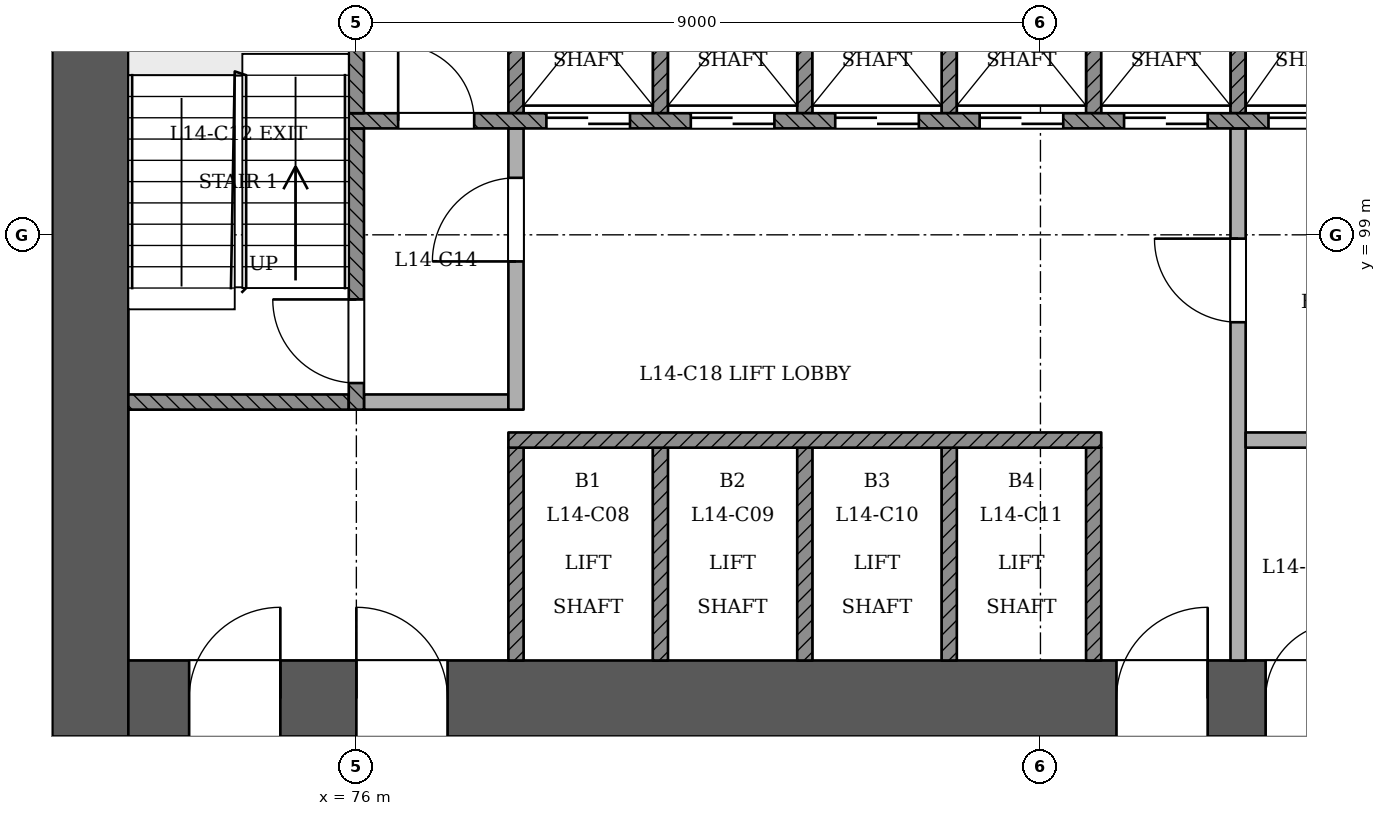
"""IFC4 building model, lengths in metres.
Left out: names, types, materials, properties, quantities, classifications, styles, units other than length and angle.
Written with IfcOpenShell. Run it as: python <this file> out.ifc"""

import sys

from ifc_helpers import new_model, si_unit, direction, frame, frame_2d, origin, place, context, subcontext, project, spatial, rectangle, extrude, element, fill, save


model = new_model("IFC4")
c1 = context("Model", 3, precision=1e-05, world=origin(), true_north=direction((0.0, 1.0)))
c2 = subcontext(c1, "Body", "Model", "MODEL_VIEW")
j1 = project(units=[si_unit("LENGTHUNIT", "METRE"), si_unit("PLANEANGLEUNIT", "RADIAN")], contexts=[c1])
p1 = place(None, origin())
s1 = spatial("IfcSite", under=j1, at=p1, CompositionType="ELEMENT")
p2 = place(p1, origin())
s2 = spatial("IfcBuilding", under=s1, at=p2, CompositionType="ELEMENT")
p3 = place(p2, frame((0.0, 0.0, 59.4)))
s3 = spatial("IfcBuildingStorey", under=s2, at=p3, CompositionType="ELEMENT", Elevation=59.4)
p4 = place(p3, frame((72.5, 92.9, 0.0), z_axis=(0.0, 0.0, 1.0), x_axis=(1.0, 0.0, 0.0)))
e1 = element("IfcWall", 1, at=p4, inside=s3, PredefinedType="SHEAR", context=c2, shape_type="SweptSolid", body=[
    extrude(rectangle(XDim=25.5, YDim=1.0, at=frame_2d((12.75, 0.0))), origin(), (0.0, 0.0, 1.0), 3.6),
])
p5 = place(p4, frame((1.3, 0.0, 0.0)))
e2 = element("IfcOpeningElement", 2, at=p5, cuts=e1, PredefinedType="OPENING", context=c2, shape_type="SweptSolid", body=[
    extrude(rectangle(XDim=1.2, YDim=2.1, at=frame_2d((0.6, 1.05))), frame((0.0, 0.51, 0.0), z_axis=(0.0, -1.0, 0.0), x_axis=(1.0, 0.0, 0.0)), (0.0, 0.0, 1.0), 1.021),
])
p6 = place(p4, frame((3.5, 0.0, 0.0)))
e3 = element("IfcOpeningElement", 3, at=p6, cuts=e1, PredefinedType="OPENING", context=c2, shape_type="SweptSolid", body=[
    extrude(rectangle(XDim=1.2, YDim=2.1, at=frame_2d((0.6, 1.05))), frame((0.0, 0.51, 0.0), z_axis=(0.0, -1.0, 0.0), x_axis=(1.0, 0.0, 0.0)), (0.0, 0.0, 1.0), 1.021),
])
p7 = place(p4, frame((13.5, 0.0, 0.0)))
e4 = element("IfcOpeningElement", 4, at=p7, cuts=e1, PredefinedType="OPENING", context=c2, shape_type="SweptSolid", body=[
    extrude(rectangle(XDim=1.2, YDim=2.1, at=frame_2d((0.6, 1.05))), frame((0.0, 0.51, 0.0), z_axis=(0.0, -1.0, 0.0), x_axis=(1.0, 0.0, 0.0)), (0.0, 0.0, 1.0), 1.021),
])
p8 = place(p4, frame((15.462, 0.0, 0.0)))
e5 = element("IfcOpeningElement", 5, at=p8, cuts=e1, PredefinedType="OPENING", context=c2, shape_type="SweptSolid", body=[
    extrude(rectangle(XDim=1.0, YDim=2.1, at=frame_2d((0.5, 1.05))), frame((0.0, 0.51, 0.0), z_axis=(0.0, -1.0, 0.0), x_axis=(1.0, 0.0, 0.0)), (0.0, 0.0, 1.0), 1.021),
])
p9 = place(p4, frame((18.3, 0.0, 0.0)))
e6 = element("IfcOpeningElement", 6, at=p9, cuts=e1, PredefinedType="OPENING", context=c2, shape_type="SweptSolid", body=[
    extrude(rectangle(XDim=1.0, YDim=2.1, at=frame_2d((0.5, 1.05))), frame((0.0, 0.51, 0.0), z_axis=(0.0, -1.0, 0.0), x_axis=(1.0, 0.0, 0.0)), (0.0, 0.0, 1.0), 1.021),
])
p10 = place(p4, frame((21.2, 0.0, 0.0)))
e7 = element("IfcOpeningElement", 7, at=p10, cuts=e1, PredefinedType="OPENING", context=c2, shape_type="SweptSolid", body=[
    extrude(rectangle(XDim=1.0, YDim=2.1, at=frame_2d((0.5, 1.05))), frame((0.0, 0.51, 0.0), z_axis=(0.0, -1.0, 0.0), x_axis=(1.0, 0.0, 0.0)), (0.0, 0.0, 1.0), 1.021),
])
p11 = place(p4, frame((23.087, 0.0, 0.0)))
e8 = element("IfcOpeningElement", 8, at=p11, cuts=e1, PredefinedType="OPENING", context=c2, shape_type="SweptSolid", body=[
    extrude(rectangle(XDim=1.0, YDim=2.1, at=frame_2d((0.5, 1.05))), frame((0.0, 0.51, 0.0), z_axis=(0.0, -1.0, 0.0), x_axis=(1.0, 0.0, 0.0)), (0.0, 0.0, 1.0), 1.021),
])
p12 = place(p3, frame((72.5, 103.9, 0.0), z_axis=(0.0, 0.0, 1.0), x_axis=(0.0, -1.0, 0.0)))
e9 = element("IfcWall", 9, at=p12, inside=s3, PredefinedType="SHEAR", context=c2, shape_type="SweptSolid", body=[
    extrude(rectangle(XDim=11.5, YDim=1.0, at=frame_2d((5.75, 0.0))), origin(), (0.0, 0.0, 1.0), 3.6),
])
p13 = place(p3, frame((62.256, 96.887, 0.0), z_axis=(0.0, 0.0, 1.0), x_axis=(0.500001966348, -0.86602426851, 0.0)))
e10 = element("IfcWall", 10, at=p13, inside=s3, PredefinedType="PARTITIONING", context=c2, shape_type="SweptSolid", body=[
    extrude(rectangle(XDim=43.626, YDim=0.15, at=frame_2d((21.813, 0.0))), origin(), (0.0, 0.0, 1.0), 2.7),
])
p14 = place(p13, frame((3.556, 0.0, 0.0)))
e11 = element("IfcOpeningElement", 11, at=p14, cuts=e10, PredefinedType="OPENING", context=c2, shape_type="SweptSolid", body=[
    extrude(rectangle(XDim=1.2, YDim=2.1, at=frame_2d((0.6, 1.05))), frame((0.0, 0.085, 0.0), z_axis=(0.0, -1.0, 0.0), x_axis=(1.0, 0.0, 0.0)), (0.0, 0.0, 1.0), 0.171),
])
p15 = place(p13, frame((12.213, 0.0, 0.0)))
e12 = element("IfcOpeningElement", 12, at=p15, cuts=e10, PredefinedType="OPENING", context=c2, shape_type="SweptSolid", body=[
    extrude(rectangle(XDim=1.2, YDim=2.1, at=frame_2d((0.6, 1.05))), frame((0.0, 0.085, 0.0), z_axis=(0.0, -1.0, 0.0), x_axis=(1.0, 0.0, 0.0)), (0.0, 0.0, 1.0), 0.171),
])
p16 = place(p13, frame((19.063, 0.0, 0.0)))
e13 = element("IfcOpeningElement", 13, at=p16, cuts=e10, PredefinedType="OPENING", context=c2, shape_type="SweptSolid", body=[
    extrude(rectangle(XDim=1.0, YDim=2.1, at=frame_2d((0.5, 1.05))), frame((0.0, 0.085, 0.0), z_axis=(0.0, -1.0, 0.0), x_axis=(1.0, 0.0, 0.0)), (0.0, 0.0, 1.0), 0.171),
])
p17 = place(p13, frame((27.963, 0.0, 0.0)))
e14 = element("IfcOpeningElement", 14, at=p17, cuts=e10, PredefinedType="OPENING", context=c2, shape_type="SweptSolid", body=[
    extrude(rectangle(XDim=1.2, YDim=2.1, at=frame_2d((0.6, 1.05))), frame((0.0, 0.085, 0.0), z_axis=(0.0, -1.0, 0.0), x_axis=(1.0, 0.0, 0.0)), (0.0, 0.0, 1.0), 0.171),
])
p18 = place(p13, frame((38.869, 0.0, 0.0)))
e15 = element("IfcOpeningElement", 15, at=p18, cuts=e10, PredefinedType="OPENING", context=c2, shape_type="SweptSolid", body=[
    extrude(rectangle(XDim=1.2, YDim=2.1, at=frame_2d((0.6, 1.05))), frame((0.0, 0.085, 0.0), z_axis=(0.0, -1.0, 0.0), x_axis=(1.0, 0.0, 0.0)), (0.0, 0.0, 1.0), 0.171),
])
p19 = place(p3, frame((85.931, 59.106, 0.0), z_axis=(0.0, 0.0, 1.0), x_axis=(0.499999543107, 0.866025667572, 0.0)))
e16 = element("IfcWall", 16, at=p19, inside=s3, PredefinedType="PARTITIONING", context=c2, shape_type="SweptSolid", body=[
    extrude(rectangle(XDim=43.626, YDim=0.15, at=frame_2d((21.813, 0.0))), origin(), (0.0, 0.0, 1.0), 2.7),
])
p20 = place(p19, frame((3.556, 0.0, 0.0)))
e17 = element("IfcOpeningElement", 17, at=p20, cuts=e16, PredefinedType="OPENING", context=c2, shape_type="SweptSolid", body=[
    extrude(rectangle(XDim=1.2, YDim=2.1, at=frame_2d((0.6, 1.05))), frame((0.0, 0.085, 0.0), z_axis=(0.0, -1.0, 0.0), x_axis=(1.0, 0.0, 0.0)), (0.0, 0.0, 1.0), 0.171),
])
p21 = place(p19, frame((14.463, 0.0, 0.0)))
e18 = element("IfcOpeningElement", 18, at=p21, cuts=e16, PredefinedType="OPENING", context=c2, shape_type="SweptSolid", body=[
    extrude(rectangle(XDim=1.2, YDim=2.1, at=frame_2d((0.6, 1.05))), frame((0.0, 0.085, 0.0), z_axis=(0.0, -1.0, 0.0), x_axis=(1.0, 0.0, 0.0)), (0.0, 0.0, 1.0), 0.171),
])
p22 = place(p19, frame((27.963, 0.0, 0.0)))
e19 = element("IfcOpeningElement", 19, at=p22, cuts=e16, PredefinedType="OPENING", context=c2, shape_type="SweptSolid", body=[
    extrude(rectangle(XDim=1.2, YDim=2.1, at=frame_2d((0.6, 1.05))), frame((0.0, 0.085, 0.0), z_axis=(0.0, -1.0, 0.0), x_axis=(1.0, 0.0, 0.0)), (0.0, 0.0, 1.0), 0.171),
])
p23 = place(p19, frame((38.869, 0.0, 0.0)))
e20 = element("IfcOpeningElement", 20, at=p23, cuts=e16, PredefinedType="OPENING", context=c2, shape_type="SweptSolid", body=[
    extrude(rectangle(XDim=1.2, YDim=2.1, at=frame_2d((0.6, 1.05))), frame((0.0, 0.085, 0.0), z_axis=(0.0, -1.0, 0.0), x_axis=(1.0, 0.0, 0.0)), (0.0, 0.0, 1.0), 0.171),
])
for number, where, z_axis, x_axis in (
    (21, (78.1, 93.4, 0.0), (0.0, 0.0, 1.0), (0.0, 1.0, 0.0)),
    (22, (80.0, 93.4, 0.0), (0.0, 0.0, 1.0), (0.0, 1.0, 0.0)),
    (23, (81.9, 93.4, 0.0), (0.0, 0.0, 1.0), (0.0, 1.0, 0.0)),
    (24, (83.8, 93.4, 0.0), (0.0, 0.0, 1.0), (0.0, 1.0, 0.0)),
    (25, (85.7, 93.4, 0.0), (0.0, 0.0, 1.0), (0.0, 1.0, 0.0)),
):
    element("IfcWall", number, at=place(p3, frame(where, z_axis=z_axis, x_axis=x_axis)), inside=s3, PredefinedType="SOLIDWALL", context=c2, shape_type="SweptSolid", body=[
        extrude(rectangle(XDim=2.8, YDim=0.2, at=frame_2d((1.4, 0.0))), origin(), (0.0, 0.0, 1.0), 3.1),
    ])
p24 = place(p3, frame((87.6, 93.4, 0.0), z_axis=(0.0, 0.0, 1.0), x_axis=(0.0, 1.0, 0.0)))
e26 = element("IfcWall", 26, at=p24, inside=s3, PredefinedType="PARTITIONING", context=c2, shape_type="SweptSolid", body=[
    extrude(rectangle(XDim=7.0, YDim=0.2, at=frame_2d((3.5, 0.0))), origin(), (0.0, 0.0, 1.0), 3.1),
])
p25 = place(p24, frame((4.45, 0.0, 0.0)))
e27 = element("IfcOpeningElement", 27, at=p25, cuts=e26, PredefinedType="OPENING", context=c2, shape_type="SweptSolid", body=[
    extrude(rectangle(XDim=1.1, YDim=2.1, at=frame_2d((0.55, 1.05))), frame((0.0, 0.11, 0.0), z_axis=(0.0, -1.0, 0.0), x_axis=(1.0, 0.0, 0.0)), (0.0, 0.0, 1.0), 0.221),
])
p26 = place(p3, frame((78.0, 96.3, 0.0), z_axis=(0.0, 0.0, 1.0), x_axis=(1.0, 0.0, 0.0)))
e28 = element("IfcWall", 28, at=p26, inside=s3, PredefinedType="SOLIDWALL", context=c2, shape_type="SweptSolid", body=[
    extrude(rectangle(XDim=7.8, YDim=0.2, at=frame_2d((3.9, 0.0))), origin(), (0.0, 0.0, 1.0), 3.1),
])
p27 = place(p3, frame((87.7, 96.3, 0.0), z_axis=(0.0, 0.0, 1.0), x_axis=(1.0, 0.0, 0.0)))
e29 = element("IfcWall", 29, at=p27, inside=s3, PredefinedType="PARTITIONING", context=c2, shape_type="SweptSolid", body=[
    extrude(rectangle(XDim=3.6, YDim=0.2, at=frame_2d((1.8, 0.0))), origin(), (0.0, 0.0, 1.0), 3.1),
])
p28 = place(p3, frame((73.0, 96.8, 0.0), z_axis=(0.0, 0.0, 1.0), x_axis=(1.0, 0.0, 0.0)))
e30 = element("IfcWall", 30, at=p28, inside=s3, PredefinedType="SOLIDWALL", context=c2, shape_type="SweptSolid", body=[
    extrude(rectangle(XDim=2.9, YDim=0.2, at=frame_2d((1.45, 0.0))), origin(), (0.0, 0.0, 1.0), 3.1),
])
p29 = place(p3, frame((76.0, 96.7, 0.0), z_axis=(0.0, 0.0, 1.0), x_axis=(0.0, 1.0, 0.0)))
e31 = element("IfcWall", 31, at=p29, inside=s3, PredefinedType="SOLIDWALL", context=c2, shape_type="SweptSolid", body=[
    extrude(rectangle(XDim=3.7, YDim=0.2, at=frame_2d((1.85, 0.0))), origin(), (0.0, 0.0, 1.0), 3.1),
])
p30 = place(p29, frame((0.35, 0.0, 0.0)))
e32 = element("IfcOpeningElement", 32, at=p30, cuts=e31, PredefinedType="OPENING", context=c2, shape_type="SweptSolid", body=[
    extrude(rectangle(XDim=1.1, YDim=2.1, at=frame_2d((0.55, 1.05))), frame((0.0, 0.11, 0.0), z_axis=(0.0, -1.0, 0.0), x_axis=(1.0, 0.0, 0.0)), (0.0, 0.0, 1.0), 0.221),
])
p31 = place(p3, frame((76.1, 96.8, 0.0), z_axis=(0.0, 0.0, 1.0), x_axis=(1.0, 0.0, 0.0)))
e33 = element("IfcWall", 33, at=p31, inside=s3, PredefinedType="PARTITIONING", context=c2, shape_type="SweptSolid", body=[
    extrude(rectangle(XDim=1.9, YDim=0.2, at=frame_2d((0.95, 0.0))), origin(), (0.0, 0.0, 1.0), 3.1),
])
p32 = place(p3, frame((78.1, 96.7, 0.0), z_axis=(0.0, 0.0, 1.0), x_axis=(0.0, 1.0, 0.0)))
e34 = element("IfcWall", 34, at=p32, inside=s3, PredefinedType="PARTITIONING", context=c2, shape_type="SweptSolid", body=[
    extrude(rectangle(XDim=3.7, YDim=0.2, at=frame_2d((1.85, 0.0))), origin(), (0.0, 0.0, 1.0), 3.1),
])
p33 = place(p32, frame((1.95, 0.0, 0.0)))
e35 = element("IfcOpeningElement", 35, at=p33, cuts=e34, PredefinedType="OPENING", context=c2, shape_type="SweptSolid", body=[
    extrude(rectangle(XDim=1.1, YDim=2.1, at=frame_2d((0.55, 1.05))), frame((0.0, 0.11, 0.0), z_axis=(0.0, -1.0, 0.0), x_axis=(1.0, 0.0, 0.0)), (0.0, 0.0, 1.0), 0.221),
])
p34 = place(p3, frame((75.9, 100.5, 0.0), z_axis=(0.0, 0.0, 1.0), x_axis=(1.0, 0.0, 0.0)))
e36 = element("IfcWall", 36, at=p34, inside=s3, PredefinedType="SOLIDWALL", context=c2, shape_type="SweptSolid", body=[
    extrude(rectangle(XDim=18.2, YDim=0.2, at=frame_2d((9.1, 0.0))), origin(), (0.0, 0.0, 1.0), 3.1),
])
p35 = place(p34, frame((2.6, 0.0, 0.0)))
e37 = element("IfcOpeningElement", 37, at=p35, cuts=e36, PredefinedType="OPENING", context=c2, shape_type="SweptSolid", body=[
    extrude(rectangle(XDim=1.1, YDim=2.1, at=frame_2d((0.55, 1.05))), frame((0.0, 0.11, 0.0), z_axis=(0.0, -1.0, 0.0), x_axis=(1.0, 0.0, 0.0)), (0.0, 0.0, 1.0), 0.221),
])
p36 = place(p34, frame((4.5, 0.0, 0.0)))
e38 = element("IfcOpeningElement", 38, at=p36, cuts=e36, PredefinedType="OPENING", context=c2, shape_type="SweptSolid", body=[
    extrude(rectangle(XDim=1.1, YDim=2.1, at=frame_2d((0.55, 1.05))), frame((0.0, 0.11, 0.0), z_axis=(0.0, -1.0, 0.0), x_axis=(1.0, 0.0, 0.0)), (0.0, 0.0, 1.0), 0.221),
])
p37 = place(p34, frame((6.4, 0.0, 0.0)))
e39 = element("IfcOpeningElement", 39, at=p37, cuts=e36, PredefinedType="OPENING", context=c2, shape_type="SweptSolid", body=[
    extrude(rectangle(XDim=1.1, YDim=2.1, at=frame_2d((0.55, 1.05))), frame((0.0, 0.11, 0.0), z_axis=(0.0, -1.0, 0.0), x_axis=(1.0, 0.0, 0.0)), (0.0, 0.0, 1.0), 0.221),
])
p38 = place(p34, frame((8.3, 0.0, 0.0)))
e40 = element("IfcOpeningElement", 40, at=p38, cuts=e36, PredefinedType="OPENING", context=c2, shape_type="SweptSolid", body=[
    extrude(rectangle(XDim=1.1, YDim=2.1, at=frame_2d((0.55, 1.05))), frame((0.0, 0.11, 0.0), z_axis=(0.0, -1.0, 0.0), x_axis=(1.0, 0.0, 0.0)), (0.0, 0.0, 1.0), 0.221),
])
p39 = place(p34, frame((10.2, 0.0, 0.0)))
e41 = element("IfcOpeningElement", 41, at=p39, cuts=e36, PredefinedType="OPENING", context=c2, shape_type="SweptSolid", body=[
    extrude(rectangle(XDim=1.1, YDim=2.1, at=frame_2d((0.55, 1.05))), frame((0.0, 0.11, 0.0), z_axis=(0.0, -1.0, 0.0), x_axis=(1.0, 0.0, 0.0)), (0.0, 0.0, 1.0), 0.221),
])
p40 = place(p34, frame((12.1, 0.0, 0.0)))
e42 = element("IfcOpeningElement", 42, at=p40, cuts=e36, PredefinedType="OPENING", context=c2, shape_type="SweptSolid", body=[
    extrude(rectangle(XDim=1.1, YDim=2.1, at=frame_2d((0.55, 1.05))), frame((0.0, 0.11, 0.0), z_axis=(0.0, -1.0, 0.0), x_axis=(1.0, 0.0, 0.0)), (0.0, 0.0, 1.0), 0.221),
])
p41 = place(p34, frame((14.0, 0.0, 0.0)))
e43 = element("IfcOpeningElement", 43, at=p41, cuts=e36, PredefinedType="OPENING", context=c2, shape_type="SweptSolid", body=[
    extrude(rectangle(XDim=1.1, YDim=2.1, at=frame_2d((0.55, 1.05))), frame((0.0, 0.11, 0.0), z_axis=(0.0, -1.0, 0.0), x_axis=(1.0, 0.0, 0.0)), (0.0, 0.0, 1.0), 0.221),
])
p42 = place(p34, frame((0.65, 0.0, 0.0)))
e44 = element("IfcOpeningElement", 44, at=p42, cuts=e36, PredefinedType="OPENING", context=c2, shape_type="SweptSolid", body=[
    extrude(rectangle(XDim=1.0, YDim=2.1, at=frame_2d((0.5, 1.05))), frame((0.0, 0.11, 0.0), z_axis=(0.0, -1.0, 0.0), x_axis=(1.0, 0.0, 0.0)), (0.0, 0.0, 1.0), 0.221),
])
p43 = place(p34, frame((16.3, 0.0, 0.0)))
e45 = element("IfcOpeningElement", 45, at=p43, cuts=e36, PredefinedType="OPENING", context=c2, shape_type="SweptSolid", body=[
    extrude(rectangle(XDim=1.0, YDim=2.1, at=frame_2d((0.5, 1.05))), frame((0.0, 0.11, 0.0), z_axis=(0.0, -1.0, 0.0), x_axis=(1.0, 0.0, 0.0)), (0.0, 0.0, 1.0), 0.221),
])
for number, where, z_axis, x_axis in (
    (46, (76.0, 100.6, 0.0), (0.0, 0.0, 1.0), (0.0, 1.0, 0.0)),
    (47, (78.1, 100.6, 0.0), (0.0, 0.0, 1.0), (0.0, 1.0, 0.0)),
    (48, (80.0, 100.6, 0.0), (0.0, 0.0, 1.0), (0.0, 1.0, 0.0)),
    (49, (81.9, 100.6, 0.0), (0.0, 0.0, 1.0), (0.0, 1.0, 0.0)),
    (50, (83.8, 100.6, 0.0), (0.0, 0.0, 1.0), (0.0, 1.0, 0.0)),
    (51, (85.7, 100.6, 0.0), (0.0, 0.0, 1.0), (0.0, 1.0, 0.0)),
    (52, (87.6, 100.6, 0.0), (0.0, 0.0, 1.0), (0.0, 1.0, 0.0)),
):
    element("IfcWall", number, at=place(p3, frame(where, z_axis=z_axis, x_axis=x_axis)), inside=s3, PredefinedType="SOLIDWALL", context=c2, shape_type="SweptSolid", body=[
        extrude(rectangle(XDim=2.8, YDim=0.2, at=frame_2d((1.4, 0.0))), origin(), (0.0, 0.0, 1.0), 3.1),
    ])
p44 = place(p35, origin())
e53 = element("IfcDoor", 53, at=p44, inside=s3, OperationType="SLIDING_TO_RIGHT", PredefinedType="NOTDEFINED", context=c2, shape_type="SweptSolid", body=[
    extrude(rectangle(XDim=1.1, YDim=2.1, at=frame_2d((0.55, 1.05))), frame((0.0, 0.025, 0.0), z_axis=(0.0, -1.0, 0.0), x_axis=(1.0, 0.0, 0.0)), (0.0, 0.0, 1.0), 0.05),
])
fill(e37, e53)
p45 = place(p36, origin())
e54 = element("IfcDoor", 54, at=p45, inside=s3, OperationType="SLIDING_TO_LEFT", PredefinedType="NOTDEFINED", context=c2, shape_type="SweptSolid", body=[
    extrude(rectangle(XDim=1.1, YDim=2.1, at=frame_2d((0.55, 1.05))), frame((0.0, 0.025, 0.0), z_axis=(0.0, -1.0, 0.0), x_axis=(1.0, 0.0, 0.0)), (0.0, 0.0, 1.0), 0.05),
])
fill(e38, e54)
p46 = place(p37, origin())
e55 = element("IfcDoor", 55, at=p46, inside=s3, OperationType="SLIDING_TO_RIGHT", PredefinedType="NOTDEFINED", context=c2, shape_type="SweptSolid", body=[
    extrude(rectangle(XDim=1.1, YDim=2.1, at=frame_2d((0.55, 1.05))), frame((0.0, 0.025, 0.0), z_axis=(0.0, -1.0, 0.0), x_axis=(1.0, 0.0, 0.0)), (0.0, 0.0, 1.0), 0.05),
])
fill(e39, e55)
p47 = place(p38, origin())
e56 = element("IfcDoor", 56, at=p47, inside=s3, OperationType="SLIDING_TO_LEFT", PredefinedType="NOTDEFINED", context=c2, shape_type="SweptSolid", body=[
    extrude(rectangle(XDim=1.1, YDim=2.1, at=frame_2d((0.55, 1.05))), frame((0.0, 0.025, 0.0), z_axis=(0.0, -1.0, 0.0), x_axis=(1.0, 0.0, 0.0)), (0.0, 0.0, 1.0), 0.05),
])
fill(e40, e56)
p48 = place(p39, origin())
e57 = element("IfcDoor", 57, at=p48, inside=s3, OperationType="SLIDING_TO_RIGHT", PredefinedType="NOTDEFINED", context=c2, shape_type="SweptSolid", body=[
    extrude(rectangle(XDim=1.1, YDim=2.1, at=frame_2d((0.55, 1.05))), frame((0.0, 0.025, 0.0), z_axis=(0.0, -1.0, 0.0), x_axis=(1.0, 0.0, 0.0)), (0.0, 0.0, 1.0), 0.05),
])
fill(e41, e57)
p49 = place(p40, origin())
e58 = element("IfcDoor", 58, at=p49, inside=s3, OperationType="SLIDING_TO_RIGHT", PredefinedType="NOTDEFINED", context=c2, shape_type="SweptSolid", body=[
    extrude(rectangle(XDim=1.1, YDim=2.1, at=frame_2d((0.55, 1.05))), frame((0.0, 0.025, 0.0), z_axis=(0.0, -1.0, 0.0), x_axis=(1.0, 0.0, 0.0)), (0.0, 0.0, 1.0), 0.05),
])
fill(e42, e58)
p50 = place(p30, origin())
e59 = element("IfcDoor", 59, at=p50, inside=s3, OperationType="SINGLE_SWING_RIGHT", PredefinedType="NOTDEFINED", context=c2, shape_type="SweptSolid", body=[
    extrude(rectangle(XDim=1.1, YDim=2.1, at=frame_2d((0.55, 1.05))), frame((0.0, 0.025, 0.0), z_axis=(0.0, -1.0, 0.0), x_axis=(1.0, 0.0, 0.0)), (0.0, 0.0, 1.0), 0.05),
])
fill(e32, e59)
p51 = place(p33, origin())
e60 = element("IfcDoor", 60, at=p51, inside=s3, OperationType="SINGLE_SWING_LEFT", PredefinedType="NOTDEFINED", context=c2, shape_type="SweptSolid", body=[
    extrude(rectangle(XDim=1.1, YDim=2.1, at=frame_2d((0.55, 1.05))), frame((0.0, 0.025, 0.0), z_axis=(0.0, -1.0, 0.0), x_axis=(1.0, 0.0, 0.0)), (0.0, 0.0, 1.0), 0.05),
])
fill(e35, e60)
p52 = place(p25, origin())
e61 = element("IfcDoor", 61, at=p52, inside=s3, OperationType="SINGLE_SWING_RIGHT", PredefinedType="NOTDEFINED", context=c2, shape_type="SweptSolid", body=[
    extrude(rectangle(XDim=1.1, YDim=2.1, at=frame_2d((0.55, 1.05))), frame((0.0, 0.025, 0.0), z_axis=(0.0, -1.0, 0.0), x_axis=(1.0, 0.0, 0.0)), (0.0, 0.0, 1.0), 0.05),
])
fill(e27, e61)
p53 = place(p5, origin())
e62 = element("IfcDoor", 62, at=p53, inside=s3, OperationType="SINGLE_SWING_RIGHT", PredefinedType="NOTDEFINED", context=c2, shape_type="SweptSolid", body=[
    extrude(rectangle(XDim=1.2, YDim=2.1, at=frame_2d((0.6, 1.05))), frame((0.0, 0.025, 0.0), z_axis=(0.0, -1.0, 0.0), x_axis=(1.0, 0.0, 0.0)), (0.0, 0.0, 1.0), 0.05),
])
fill(e2, e62)
p54 = place(p6, origin())
e63 = element("IfcDoor", 63, at=p54, inside=s3, OperationType="SINGLE_SWING_LEFT", PredefinedType="NOTDEFINED", context=c2, shape_type="SweptSolid", body=[
    extrude(rectangle(XDim=1.2, YDim=2.1, at=frame_2d((0.6, 1.05))), frame((0.0, 0.025, 0.0), z_axis=(0.0, -1.0, 0.0), x_axis=(1.0, 0.0, 0.0)), (0.0, 0.0, 1.0), 0.05),
])
fill(e3, e63)
p55 = place(p7, origin())
e64 = element("IfcDoor", 64, at=p55, inside=s3, OperationType="SINGLE_SWING_RIGHT", PredefinedType="NOTDEFINED", context=c2, shape_type="SweptSolid", body=[
    extrude(rectangle(XDim=1.2, YDim=2.1, at=frame_2d((0.6, 1.05))), frame((0.0, 0.025, 0.0), z_axis=(0.0, -1.0, 0.0), x_axis=(1.0, 0.0, 0.0)), (0.0, 0.0, 1.0), 0.05),
])
fill(e4, e64)
p56 = place(p42, origin())
e65 = element("IfcDoor", 65, at=p56, inside=s3, OperationType="SINGLE_SWING_LEFT", PredefinedType="NOTDEFINED", context=c2, shape_type="SweptSolid", body=[
    extrude(rectangle(XDim=1.0, YDim=2.1, at=frame_2d((0.5, 1.05))), frame((0.0, 0.025, 0.0), z_axis=(0.0, -1.0, 0.0), x_axis=(1.0, 0.0, 0.0)), (0.0, 0.0, 1.0), 0.05),
])
fill(e44, e65)
p57 = place(p8, origin())
e66 = element("IfcDoor", 66, at=p57, inside=s3, OperationType="SINGLE_SWING_RIGHT", PredefinedType="NOTDEFINED", context=c2, shape_type="SweptSolid", body=[
    extrude(rectangle(XDim=1.0, YDim=2.1, at=frame_2d((0.5, 1.05))), frame((0.0, 0.025, 0.0), z_axis=(0.0, -1.0, 0.0), x_axis=(1.0, 0.0, 0.0)), (0.0, 0.0, 1.0), 0.05),
])
fill(e5, e66)
save(model, sys.argv[1])
